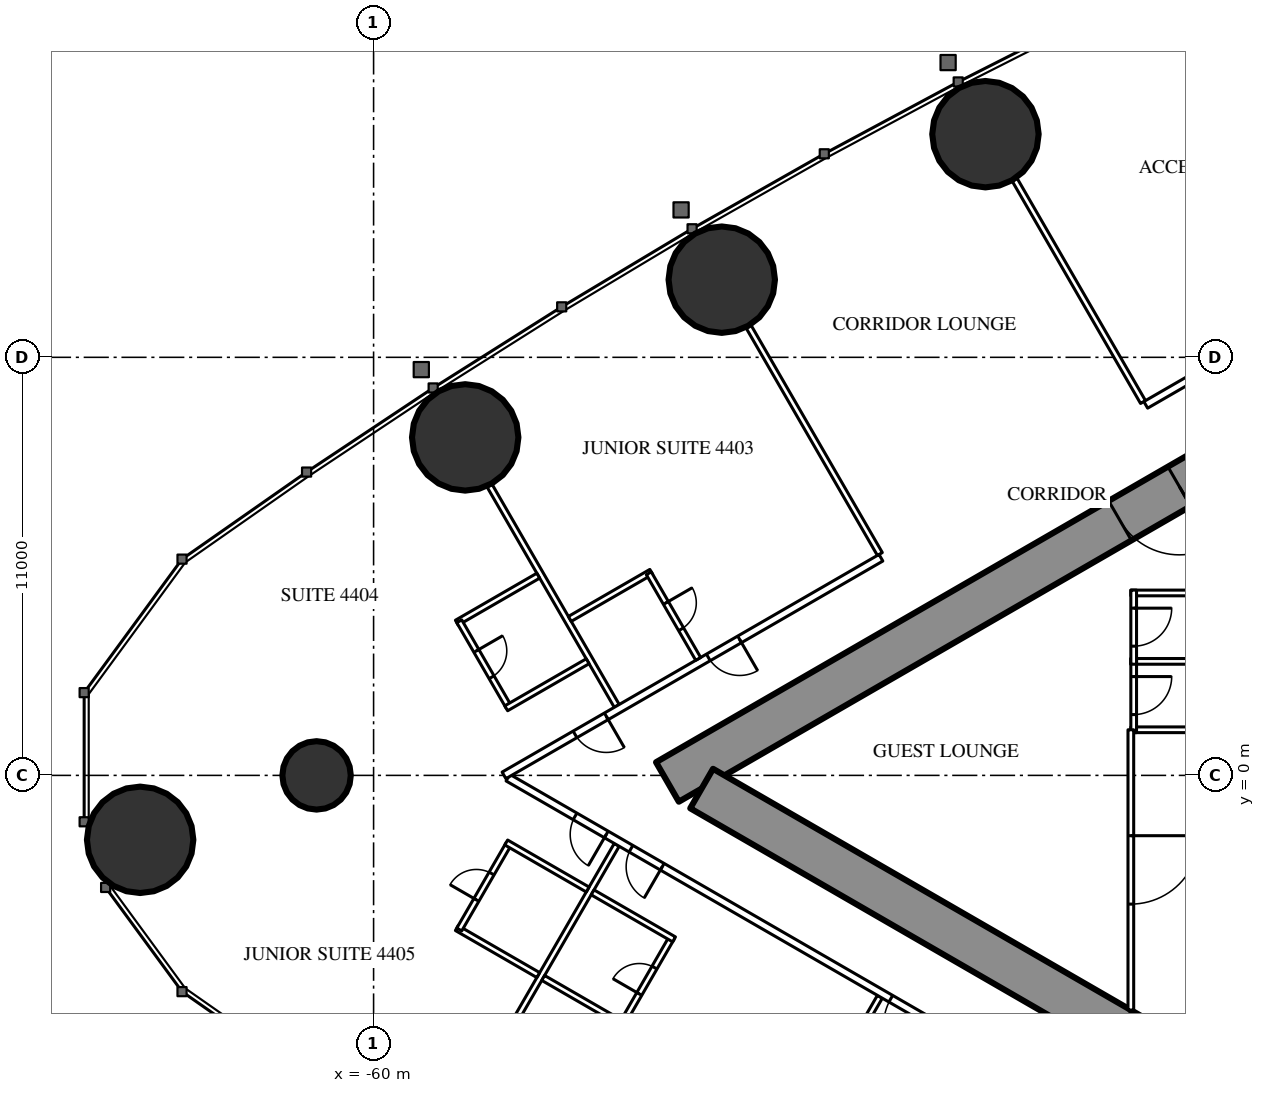
"""IFC4 building model, lengths in metres.
Left out: names, types, materials, properties, quantities, classifications, styles, units other than length and angle.
Written with IfcOpenShell. Run it as: python <this file> out.ifc"""

import sys

from ifc_helpers import new_model, si_unit, direction, frame, frame_2d, origin, origin_2d, place, context, subcontext, project, spatial, rectangle, circle, extrude, element, fill, save


model = new_model("IFC4")
c1 = context("Model", 3, precision=1e-05, world=origin(), true_north=direction((0.0, 1.0)))
c2 = subcontext(c1, "Body", "Model", "MODEL_VIEW")
j1 = project(units=[si_unit("LENGTHUNIT", "METRE"), si_unit("PLANEANGLEUNIT", "RADIAN")], contexts=[c1])
p1 = place(None, origin())
s1 = spatial("IfcSite", under=j1, at=p1, CompositionType="ELEMENT")
p2 = place(p1, origin())
s2 = spatial("IfcBuilding", under=s1, at=p2, CompositionType="ELEMENT")
p3 = place(p2, frame((0.0, 0.0, 166.8)))
s3 = spatial("IfcBuildingStorey", under=s2, at=p3, CompositionType="ELEMENT", Elevation=166.8)
for number, where, z_axis, x_axis in (
    (1, (-66.143, -1.695, 0.0), (0.0, 0.0, 1.0), (1.0, 0.0, 0.0)),
    (2, (-43.9, 16.871, 0.0), (0.0, 0.0, 1.0), (1.0, 0.0, 0.0)),
    (3, (-50.839, 13.043, 0.0), (0.0, 0.0, 1.0), (1.0, 0.0, 0.0)),
    (4, (-57.59, 8.893, 0.0), (0.0, 0.0, 1.0), (1.0, 0.0, 0.0)),
):
    element("IfcColumn", number, at=place(p3, frame(where, z_axis=z_axis, x_axis=x_axis)), inside=s3, PredefinedType="COLUMN", context=c2, shape_type="SweptSolid", body=[
        extrude(circle(Radius=1.4, at=origin_2d()), origin(), (0.0, 0.0, 1.0), 3.5),
    ])
p4 = place(p3, frame((-61.5, 0.0, 0.0), z_axis=(0.0, 0.0, 1.0), x_axis=(1.0, 0.0, 0.0)))
e5 = element("IfcColumn", 5, at=p4, inside=s3, PredefinedType="COLUMN", context=c2, shape_type="SweptSolid", body=[
    extrude(circle(Radius=0.9, at=origin_2d()), origin(), (0.0, 0.0, 1.0), 3.5),
])
p5 = place(p3, frame((-27.2, 14.3, 0.0), z_axis=(0.0, 0.0, 1.0), x_axis=(-0.866026593062, -0.499997940104, 0.0)))
e6 = element("IfcWall", 6, at=p5, inside=s3, PredefinedType="SHEAR", context=c2, shape_type="SweptSolid", body=[
    extrude(rectangle(XDim=28.946, YDim=1.2, at=frame_2d((14.473, 0.0))), origin(), (0.0, 0.0, 1.0), 3.5),
])
p6 = place(p5, frame((4.6, 0.0, 0.0)))
e7 = element("IfcOpeningElement", 7, at=p6, cuts=e6, PredefinedType="OPENING", context=c2, shape_type="SweptSolid", body=[
    extrude(rectangle(XDim=1.0, YDim=2.2, at=frame_2d((0.5, 1.1))), frame((0.0, 0.61, 0.0), z_axis=(0.0, -1.0, 0.0), x_axis=(1.0, 0.0, 0.0)), (0.0, 0.0, 1.0), 1.22),
])
p7 = place(p5, frame((13.395, 0.0, 0.0)))
e8 = element("IfcOpeningElement", 8, at=p7, cuts=e6, PredefinedType="OPENING", context=c2, shape_type="SweptSolid", body=[
    extrude(rectangle(XDim=1.8, YDim=2.2, at=frame_2d((0.9, 1.1))), frame((0.0, 0.61, 0.0), z_axis=(0.0, -1.0, 0.0), x_axis=(1.0, 0.0, 0.0)), (0.0, 0.0, 1.0), 1.22),
])
p8 = place(p3, frame((-27.2, -14.3, 0.0), z_axis=(0.0, 0.0, 1.0), x_axis=(-0.866024021859, 0.500002393557, 0.0)))
e9 = element("IfcWall", 9, at=p8, inside=s3, PredefinedType="SHEAR", context=c2, shape_type="SweptSolid", body=[
    extrude(rectangle(XDim=27.907, YDim=1.2, at=frame_2d((13.954, 0.0))), origin(), (0.0, 0.0, 1.0), 3.5),
])
p9 = place(p8, frame((4.6, 0.0, 0.0)))
e10 = element("IfcOpeningElement", 10, at=p9, cuts=e9, PredefinedType="OPENING", context=c2, shape_type="SweptSolid", body=[
    extrude(rectangle(XDim=1.0, YDim=2.2, at=frame_2d((0.5, 1.1))), frame((0.0, 0.61, 0.0), z_axis=(0.0, -1.0, 0.0), x_axis=(1.0, 0.0, 0.0)), (0.0, 0.0, 1.0), 1.22),
])
p10 = place(p8, frame((13.395, 0.0, 0.0)))
e11 = element("IfcOpeningElement", 11, at=p10, cuts=e9, PredefinedType="OPENING", context=c2, shape_type="SweptSolid", body=[
    extrude(rectangle(XDim=1.8, YDim=2.2, at=frame_2d((0.9, 1.1))), frame((0.0, 0.61, 0.0), z_axis=(0.0, -1.0, 0.0), x_axis=(1.0, 0.0, 0.0)), (0.0, 0.0, 1.0), 1.22),
])
p11 = place(p3, frame((-39.754, 9.823, 0.0), z_axis=(0.0, 0.0, 1.0), x_axis=(-0.499997670926, 0.866026748472, 0.0)))
e12 = element("IfcWall", 12, at=p11, inside=s3, PredefinedType="PARTITIONING", context=c2, shape_type="SweptSolid", body=[
    extrude(rectangle(XDim=6.757, YDim=0.15, at=frame_2d((3.379, 0.0))), origin(), (0.0, 0.0, 1.0), 2.3),
])
p12 = place(p3, frame((-46.679, 5.825, 0.0), z_axis=(0.0, 0.0, 1.0), x_axis=(-0.500006839597, 0.866021454905, 0.0)))
e13 = element("IfcWall", 13, at=p12, inside=s3, PredefinedType="PARTITIONING", context=c2, shape_type="SweptSolid", body=[
    extrude(rectangle(XDim=6.911, YDim=0.15, at=frame_2d((3.456, 0.0))), origin(), (0.0, 0.0, 1.0), 2.3),
])
p13 = place(p3, frame((-53.602, 1.828, 0.0), z_axis=(0.0, 0.0, 1.0), x_axis=(-0.49999191814, 0.866030069798, 0.0)))
e14 = element("IfcWall", 14, at=p13, inside=s3, PredefinedType="PARTITIONING", context=c2, shape_type="SweptSolid", body=[
    extrude(rectangle(XDim=6.692, YDim=0.15, at=frame_2d((3.346, 0.0))), origin(), (0.0, 0.0, 1.0), 2.3),
])
p14 = place(p3, frame((-46.679, -5.825, 0.0), z_axis=(0.0, 0.0, 1.0), x_axis=(-0.500006839597, -0.866021454905, 0.0)))
e15 = element("IfcWall", 15, at=p14, inside=s3, PredefinedType="PARTITIONING", context=c2, shape_type="SweptSolid", body=[
    extrude(rectangle(XDim=6.911, YDim=0.15, at=frame_2d((3.456, 0.0))), origin(), (0.0, 0.0, 1.0), 2.3),
])
p15 = place(p3, frame((-53.602, -1.828, 0.0), z_axis=(0.0, 0.0, 1.0), x_axis=(-0.49999191814, -0.866030069798, 0.0)))
e16 = element("IfcWall", 16, at=p15, inside=s3, PredefinedType="PARTITIONING", context=c2, shape_type="SweptSolid", body=[
    extrude(rectangle(XDim=6.692, YDim=0.15, at=frame_2d((3.346, 0.0))), origin(), (0.0, 0.0, 1.0), 2.3),
])
p16 = place(p3, frame((-44.715, -6.844, 0.0), z_axis=(0.0, 0.0, 1.0), x_axis=(-0.866025261224, 0.500000246922, 0.0)))
e17 = element("IfcWall", 17, at=p16, inside=s3, PredefinedType="PARTITIONING", context=c2, shape_type="SweptSolid", body=[
    extrude(rectangle(XDim=13.567, YDim=0.2, at=frame_2d((6.783, 0.0))), origin(), (0.0, 0.0, 1.0), 3.25),
])
p17 = place(p16, frame((10.579, 0.0, 0.0)))
e18 = element("IfcOpeningElement", 18, at=p17, cuts=e17, PredefinedType="OPENING", context=c2, shape_type="SweptSolid", body=[
    extrude(rectangle(XDim=0.95, YDim=2.2, at=frame_2d((0.475, 1.1))), frame((0.0, 0.11, 0.0), z_axis=(0.0, -1.0, 0.0), x_axis=(1.0, 0.0, 0.0)), (0.0, 0.0, 1.0), 0.22),
])
p18 = place(p16, frame((8.879, 0.0, 0.0)))
e19 = element("IfcOpeningElement", 19, at=p18, cuts=e17, PredefinedType="OPENING", context=c2, shape_type="SweptSolid", body=[
    extrude(rectangle(XDim=0.95, YDim=2.2, at=frame_2d((0.475, 1.1))), frame((0.0, 0.11, 0.0), z_axis=(0.0, -1.0, 0.0), x_axis=(1.0, 0.0, 0.0)), (0.0, 0.0, 1.0), 0.22),
])
p19 = place(p16, frame((0.5, 0.0, 0.0)))
e20 = element("IfcOpeningElement", 20, at=p19, cuts=e17, PredefinedType="OPENING", context=c2, shape_type="SweptSolid", body=[
    extrude(rectangle(XDim=1.435, YDim=2.2, at=frame_2d((0.718, 1.1))), frame((0.0, 0.11, 0.0), z_axis=(0.0, -1.0, 0.0), x_axis=(1.0, 0.0, 0.0)), (0.0, 0.0, 1.0), 0.22),
])
p20 = place(p3, frame((-27.86, 16.575, 0.0), z_axis=(0.0, 0.0, 1.0), x_axis=(-0.866026850238, -0.499997494661, 0.0)))
e21 = element("IfcWall", 21, at=p20, inside=s3, PredefinedType="PARTITIONING", context=c2, shape_type="SweptSolid", body=[
    extrude(rectangle(XDim=13.651, YDim=0.2, at=frame_2d((6.826, 0.0))), origin(), (0.0, 0.0, 1.0), 3.25),
])
p21 = place(p20, frame((3.75, 0.0, 0.0)))
e22 = element("IfcOpeningElement", 22, at=p21, cuts=e21, PredefinedType="OPENING", context=c2, shape_type="SweptSolid", body=[
    extrude(rectangle(XDim=1.0, YDim=2.2, at=frame_2d((0.5, 1.1))), frame((0.0, 0.11, 0.0), z_axis=(0.0, -1.0, 0.0), x_axis=(1.0, 0.0, 0.0)), (0.0, 0.0, 1.0), 0.22),
])
p22 = place(p3, frame((-46.65, 5.726, 0.0), z_axis=(0.0, 0.0, 1.0), x_axis=(-0.866027963864, -0.499995565786, 0.0)))
e23 = element("IfcWall", 23, at=p22, inside=s3, PredefinedType="PARTITIONING", context=c2, shape_type="SweptSolid", body=[
    extrude(rectangle(XDim=11.452, YDim=0.2, at=frame_2d((5.726, 0.0))), origin(), (0.0, 0.0, 1.0), 3.25),
])
p23 = place(p22, frame((4.294, 0.0, 0.0)))
e24 = element("IfcOpeningElement", 24, at=p23, cuts=e23, PredefinedType="OPENING", context=c2, shape_type="SweptSolid", body=[
    extrude(rectangle(XDim=0.95, YDim=2.2, at=frame_2d((0.475, 1.1))), frame((0.0, 0.11, 0.0), z_axis=(0.0, -1.0, 0.0), x_axis=(1.0, 0.0, 0.0)), (0.0, 0.0, 1.0), 0.22),
])
p24 = place(p22, frame((8.344, 0.0, 0.0)))
e25 = element("IfcOpeningElement", 25, at=p24, cuts=e23, PredefinedType="OPENING", context=c2, shape_type="SweptSolid", body=[
    extrude(rectangle(XDim=0.95, YDim=2.2, at=frame_2d((0.475, 1.1))), frame((0.0, 0.11, 0.0), z_axis=(0.0, -1.0, 0.0), x_axis=(1.0, 0.0, 0.0)), (0.0, 0.0, 1.0), 0.22),
])
p25 = place(p3, frame((-52.694, 5.355, 0.0), z_axis=(0.0, 0.0, 1.0), x_axis=(-0.866031185235, -0.4999899861, 0.0)))
e26 = element("IfcWall", 26, at=p25, inside=s3, PredefinedType="PARTITIONING", context=c2, shape_type="SweptSolid", body=[
    extrude(rectangle(XDim=2.475, YDim=0.15, at=frame_2d((1.238, 0.0))), origin(), (0.0, 0.0, 1.0), 3.25),
])
p26 = place(p3, frame((-51.459, 3.065, 0.0), z_axis=(0.0, 0.0, 1.0), x_axis=(-0.499936506574, 0.866062058628, 0.0)))
e27 = element("IfcWall", 27, at=p26, inside=s3, PredefinedType="PARTITIONING", context=c2, shape_type="SweptSolid", body=[
    extrude(rectangle(XDim=2.6, YDim=0.15, at=frame_2d((1.3, 0.0))), origin(), (0.0, 0.0, 1.0), 3.25),
])
p27 = place(p26, frame((0.9, 0.0, 0.0)))
e28 = element("IfcOpeningElement", 28, at=p27, cuts=e27, PredefinedType="OPENING", context=c2, shape_type="SweptSolid", body=[
    extrude(rectangle(XDim=0.8, YDim=2.2, at=frame_2d((0.4, 1.1))), frame((0.0, 0.085, 0.0), z_axis=(0.0, -1.0, 0.0), x_axis=(1.0, 0.0, 0.0)), (0.0, 0.0, 1.0), 0.17),
])
p28 = place(p3, frame((-55.667, 5.255, 0.0), z_axis=(0.0, 0.0, 1.0), x_axis=(-0.866006523861, -0.500032699561, 0.0)))
e29 = element("IfcWall", 29, at=p28, inside=s3, PredefinedType="PARTITIONING", context=c2, shape_type="SweptSolid", body=[
    extrude(rectangle(XDim=2.475, YDim=0.15, at=frame_2d((1.237, 0.0))), origin(), (0.0, 0.0, 1.0), 3.25),
])
p29 = place(p3, frame((-56.446, 1.803, 0.0), z_axis=(0.0, 0.0, 1.0), x_axis=(-0.499936506574, 0.866062058628, 0.0)))
e30 = element("IfcWall", 30, at=p29, inside=s3, PredefinedType="PARTITIONING", context=c2, shape_type="SweptSolid", body=[
    extrude(rectangle(XDim=2.6, YDim=0.15, at=frame_2d((1.3, 0.0))), origin(), (0.0, 0.0, 1.0), 3.25),
])
p30 = place(p29, frame((0.9, 0.0, 0.0)))
e31 = element("IfcOpeningElement", 31, at=p30, cuts=e30, PredefinedType="OPENING", context=c2, shape_type="SweptSolid", body=[
    extrude(rectangle(XDim=0.8, YDim=2.2, at=frame_2d((0.4, 1.1))), frame((0.0, 0.085, 0.0), z_axis=(0.0, -1.0, 0.0), x_axis=(1.0, 0.0, 0.0)), (0.0, 0.0, 1.0), 0.17),
])
p31 = place(p3, frame((-54.367, 3.003, 0.0), z_axis=(0.0, 0.0, 1.0), x_axis=(-0.866031185235, -0.4999899861, 0.0)))
e32 = element("IfcWall", 32, at=p31, inside=s3, PredefinedType="PARTITIONING", context=c2, shape_type="SweptSolid", body=[
    extrude(rectangle(XDim=2.475, YDim=0.15, at=frame_2d((1.238, 0.0))), origin(), (0.0, 0.0, 1.0), 3.25),
])
p32 = place(p3, frame((-55.667, -5.255, 0.0), z_axis=(0.0, 0.0, 1.0), x_axis=(-0.866006523861, 0.500032699561, 0.0)))
e33 = element("IfcWall", 33, at=p32, inside=s3, PredefinedType="PARTITIONING", context=c2, shape_type="SweptSolid", body=[
    extrude(rectangle(XDim=2.475, YDim=0.15, at=frame_2d((1.237, 0.0))), origin(), (0.0, 0.0, 1.0), 3.25),
])
p33 = place(p3, frame((-56.446, -1.803, 0.0), z_axis=(0.0, 0.0, 1.0), x_axis=(-0.499936506574, -0.866062058628, 0.0)))
e34 = element("IfcWall", 34, at=p33, inside=s3, PredefinedType="PARTITIONING", context=c2, shape_type="SweptSolid", body=[
    extrude(rectangle(XDim=2.6, YDim=0.15, at=frame_2d((1.3, 0.0))), origin(), (0.0, 0.0, 1.0), 3.25),
])
p34 = place(p33, frame((0.9, 0.0, 0.0)))
e35 = element("IfcOpeningElement", 35, at=p34, cuts=e34, PredefinedType="OPENING", context=c2, shape_type="SweptSolid", body=[
    extrude(rectangle(XDim=0.8, YDim=2.2, at=frame_2d((0.4, 1.1))), frame((0.0, 0.085, 0.0), z_axis=(0.0, -1.0, 0.0), x_axis=(1.0, 0.0, 0.0)), (0.0, 0.0, 1.0), 0.17),
])
for number, where, z_axis, x_axis in (
    (36, (-54.367, -3.003, 0.0), (0.0, 0.0, 1.0), (-0.866, 0.5, 0.0)),
    (37, (-53.394, -6.567, 0.0), (0.0, 0.0, 1.0), (-0.866, 0.5, 0.0)),
):
    element("IfcWall", number, at=place(p3, frame(where, z_axis=z_axis, x_axis=x_axis)), inside=s3, PredefinedType="PARTITIONING", context=c2, shape_type="SweptSolid", body=[
        extrude(rectangle(XDim=2.475, YDim=0.15, at=frame_2d((1.238, 0.0))), origin(), (0.0, 0.0, 1.0), 3.25),
    ])
p35 = place(p3, frame((-52.159, -4.278, 0.0), z_axis=(0.0, 0.0, 1.0), x_axis=(-0.500047596559, -0.865997922154, 0.0)))
e38 = element("IfcWall", 38, at=p35, inside=s3, PredefinedType="PARTITIONING", context=c2, shape_type="SweptSolid", body=[
    extrude(rectangle(XDim=2.6, YDim=0.15, at=frame_2d((1.3, 0.0))), origin(), (0.0, 0.0, 1.0), 3.25),
])
p36 = place(p35, frame((0.9, 0.0, 0.0)))
e39 = element("IfcOpeningElement", 39, at=p36, cuts=e38, PredefinedType="OPENING", context=c2, shape_type="SweptSolid", body=[
    extrude(rectangle(XDim=0.8, YDim=2.2, at=frame_2d((0.4, 1.1))), frame((0.0, 0.085, 0.0), z_axis=(0.0, -1.0, 0.0), x_axis=(1.0, 0.0, 0.0)), (0.0, 0.0, 1.0), 0.17),
])
p37 = place(p3, frame((-52.094, -4.315, 0.0), z_axis=(0.0, 0.0, 1.0), x_axis=(-0.866006523861, 0.500032699561, 0.0)))
e40 = element("IfcWall", 40, at=p37, inside=s3, PredefinedType="PARTITIONING", context=c2, shape_type="SweptSolid", body=[
    extrude(rectangle(XDim=2.475, YDim=0.15, at=frame_2d((1.237, 0.0))), origin(), (0.0, 0.0, 1.0), 2.45),
])
for number, where, z_axis, x_axis in (
    (41, (-37.9, 1.2, 0.0), (0.0, 0.0, 1.0), (-1.0, 0.0, 0.0)),
    (42, (-37.9, 3.0, 0.0), (0.0, 0.0, 1.0), (-1.0, 0.0, 0.0)),
    (43, (-37.9, 4.8, 0.0), (0.0, 0.0, 1.0), (-1.0, 0.0, 0.0)),
):
    element("IfcWall", number, at=place(p3, frame(where, z_axis=z_axis, x_axis=x_axis)), inside=s3, PredefinedType="PARTITIONING", context=c2, shape_type="SweptSolid", body=[
        extrude(rectangle(XDim=2.175, YDim=0.15, at=frame_2d((1.087, 0.0))), origin(), (0.0, 0.0, 1.0), 3.25),
    ])
p38 = place(p3, frame((-40.0, 3.075, 0.0), z_axis=(0.0, 0.0, 1.0), x_axis=(0.0, -1.0, 0.0)))
e44 = element("IfcWall", 44, at=p38, inside=s3, PredefinedType="PARTITIONING", context=c2, shape_type="SweptSolid", body=[
    extrude(rectangle(XDim=1.95, YDim=0.15, at=frame_2d((0.975, 0.0))), origin(), (0.0, 0.0, 1.0), 3.25),
])
p39 = place(p38, frame((0.475, 0.0, 0.0)))
e45 = element("IfcOpeningElement", 45, at=p39, cuts=e44, PredefinedType="OPENING", context=c2, shape_type="SweptSolid", body=[
    extrude(rectangle(XDim=1.0, YDim=2.2, at=frame_2d((0.5, 1.1))), frame((0.0, 0.085, 0.0), z_axis=(0.0, -1.0, 0.0), x_axis=(1.0, 0.0, 0.0)), (0.0, 0.0, 1.0), 0.17),
])
p40 = place(p3, frame((-40.0, 4.875, 0.0), z_axis=(0.0, 0.0, 1.0), x_axis=(0.0, -1.0, 0.0)))
e46 = element("IfcWall", 46, at=p40, inside=s3, PredefinedType="PARTITIONING", context=c2, shape_type="SweptSolid", body=[
    extrude(rectangle(XDim=1.95, YDim=0.15, at=frame_2d((0.975, 0.0))), origin(), (0.0, 0.0, 1.0), 3.25),
])
p41 = place(p40, frame((0.475, 0.0, 0.0)))
e47 = element("IfcOpeningElement", 47, at=p41, cuts=e46, PredefinedType="OPENING", context=c2, shape_type="SweptSolid", body=[
    extrude(rectangle(XDim=1.0, YDim=2.2, at=frame_2d((0.5, 1.1))), frame((0.0, 0.085, 0.0), z_axis=(0.0, -1.0, 0.0), x_axis=(1.0, 0.0, 0.0)), (0.0, 0.0, 1.0), 0.17),
])
p42 = place(p3, frame((-40.075, 1.2, 0.0), z_axis=(0.0, 0.0, 1.0), x_axis=(0.0, -1.0, 0.0)))
e48 = element("IfcWall", 48, at=p42, inside=s3, PredefinedType="PARTITIONING", context=c2, shape_type="SweptSolid", body=[
    extrude(rectangle(XDim=7.374, YDim=0.15, at=frame_2d((3.687, 0.0))), origin(), (0.0, 0.0, 1.0), 3.25),
])
p43 = place(p42, frame((2.787, 0.0, 0.0)))
e49 = element("IfcOpeningElement", 49, at=p43, cuts=e48, PredefinedType="OPENING", context=c2, shape_type="SweptSolid", body=[
    extrude(rectangle(XDim=1.8, YDim=2.2, at=frame_2d((0.9, 1.1))), frame((0.0, 0.085, 0.0), z_axis=(0.0, -1.0, 0.0), x_axis=(1.0, 0.0, 0.0)), (0.0, 0.0, 1.0), 0.17),
])
p44 = place(p27, origin())
e50 = element("IfcDoor", 50, at=p44, inside=s3, OperationType="SINGLE_SWING_RIGHT", PredefinedType="DOOR", context=c2, shape_type="SweptSolid", body=[
    extrude(rectangle(XDim=0.8, YDim=2.2, at=frame_2d((0.4, 1.1))), frame((0.0, 0.025, 0.0), z_axis=(0.0, -1.0, 0.0), x_axis=(1.0, 0.0, 0.0)), (0.0, 0.0, 1.0), 0.05),
])
fill(e28, e50)
p45 = place(p23, origin())
e51 = element("IfcDoor", 51, at=p45, inside=s3, OperationType="SINGLE_SWING_LEFT", PredefinedType="DOOR", context=c2, shape_type="SweptSolid", body=[
    extrude(rectangle(XDim=0.95, YDim=2.2, at=frame_2d((0.475, 1.1))), frame((0.0, 0.025, 0.0), z_axis=(0.0, -1.0, 0.0), x_axis=(1.0, 0.0, 0.0)), (0.0, 0.0, 1.0), 0.05),
])
fill(e24, e51)
p46 = place(p30, origin())
e52 = element("IfcDoor", 52, at=p46, inside=s3, OperationType="SINGLE_SWING_RIGHT", PredefinedType="DOOR", context=c2, shape_type="SweptSolid", body=[
    extrude(rectangle(XDim=0.8, YDim=2.2, at=frame_2d((0.4, 1.1))), frame((0.0, 0.025, 0.0), z_axis=(0.0, -1.0, 0.0), x_axis=(1.0, 0.0, 0.0)), (0.0, 0.0, 1.0), 0.05),
])
fill(e31, e52)
p47 = place(p24, origin())
e53 = element("IfcDoor", 53, at=p47, inside=s3, OperationType="SINGLE_SWING_LEFT", PredefinedType="DOOR", context=c2, shape_type="SweptSolid", body=[
    extrude(rectangle(XDim=0.95, YDim=2.2, at=frame_2d((0.475, 1.1))), frame((0.0, 0.025, 0.0), z_axis=(0.0, -1.0, 0.0), x_axis=(1.0, 0.0, 0.0)), (0.0, 0.0, 1.0), 0.05),
])
fill(e25, e53)
p48 = place(p34, origin())
e54 = element("IfcDoor", 54, at=p48, inside=s3, OperationType="SINGLE_SWING_RIGHT", PredefinedType="DOOR", context=c2, shape_type="SweptSolid", body=[
    extrude(rectangle(XDim=0.8, YDim=2.2, at=frame_2d((0.4, 1.1))), frame((0.0, 0.025, 0.0), z_axis=(0.0, -1.0, 0.0), x_axis=(1.0, 0.0, 0.0)), (0.0, 0.0, 1.0), 0.05),
])
fill(e35, e54)
p49 = place(p17, origin())
e55 = element("IfcDoor", 55, at=p49, inside=s3, OperationType="SINGLE_SWING_LEFT", PredefinedType="DOOR", context=c2, shape_type="SweptSolid", body=[
    extrude(rectangle(XDim=0.95, YDim=2.2, at=frame_2d((0.475, 1.1))), frame((0.0, 0.025, 0.0), z_axis=(0.0, -1.0, 0.0), x_axis=(1.0, 0.0, 0.0)), (0.0, 0.0, 1.0), 0.05),
])
fill(e18, e55)
p50 = place(p36, origin())
e56 = element("IfcDoor", 56, at=p50, inside=s3, OperationType="SINGLE_SWING_RIGHT", PredefinedType="DOOR", context=c2, shape_type="SweptSolid", body=[
    extrude(rectangle(XDim=0.8, YDim=2.2, at=frame_2d((0.4, 1.1))), frame((0.0, 0.025, 0.0), z_axis=(0.0, -1.0, 0.0), x_axis=(1.0, 0.0, 0.0)), (0.0, 0.0, 1.0), 0.05),
])
fill(e39, e56)
p51 = place(p18, origin())
e57 = element("IfcDoor", 57, at=p51, inside=s3, OperationType="SINGLE_SWING_LEFT", PredefinedType="DOOR", context=c2, shape_type="SweptSolid", body=[
    extrude(rectangle(XDim=0.95, YDim=2.2, at=frame_2d((0.475, 1.1))), frame((0.0, 0.025, 0.0), z_axis=(0.0, -1.0, 0.0), x_axis=(1.0, 0.0, 0.0)), (0.0, 0.0, 1.0), 0.05),
])
fill(e19, e57)
p52 = place(p19, origin())
e58 = element("IfcDoor", 58, at=p52, inside=s3, OperationType="SINGLE_SWING_LEFT", PredefinedType="DOOR", context=c2, shape_type="SweptSolid", body=[
    extrude(rectangle(XDim=1.435, YDim=2.2, at=frame_2d((0.718, 1.1))), frame((0.0, 0.025, 0.0), z_axis=(0.0, -1.0, 0.0), x_axis=(1.0, 0.0, 0.0)), (0.0, 0.0, 1.0), 0.05),
])
fill(e20, e58)
p53 = place(p39, origin())
e59 = element("IfcDoor", 59, at=p53, inside=s3, OperationType="SINGLE_SWING_LEFT", PredefinedType="DOOR", context=c2, shape_type="SweptSolid", body=[
    extrude(rectangle(XDim=1.0, YDim=2.2, at=frame_2d((0.5, 1.1))), frame((0.0, 0.025, 0.0), z_axis=(0.0, -1.0, 0.0), x_axis=(1.0, 0.0, 0.0)), (0.0, 0.0, 1.0), 0.05),
])
fill(e45, e59)
p54 = place(p41, origin())
e60 = element("IfcDoor", 60, at=p54, inside=s3, OperationType="SINGLE_SWING_LEFT", PredefinedType="DOOR", context=c2, shape_type="SweptSolid", body=[
    extrude(rectangle(XDim=1.0, YDim=2.2, at=frame_2d((0.5, 1.1))), frame((0.0, 0.025, 0.0), z_axis=(0.0, -1.0, 0.0), x_axis=(1.0, 0.0, 0.0)), (0.0, 0.0, 1.0), 0.05),
])
fill(e47, e60)
p55 = place(p43, origin())
e61 = element("IfcDoor", 61, at=p55, inside=s3, OperationType="DOUBLE_DOOR_SINGLE_SWING", PredefinedType="DOOR", context=c2, shape_type="SweptSolid", body=[
    extrude(rectangle(XDim=1.8, YDim=2.2, at=frame_2d((0.9, 1.1))), frame((0.0, 0.025, 0.0), z_axis=(0.0, -1.0, 0.0), x_axis=(1.0, 0.0, 0.0)), (0.0, 0.0, 1.0), 0.05),
])
fill(e49, e61)
p56 = place(p7, origin())
e62 = element("IfcDoor", 62, at=p56, inside=s3, OperationType="DOUBLE_DOOR_SINGLE_SWING", PredefinedType="DOOR", context=c2, shape_type="SweptSolid", body=[
    extrude(rectangle(XDim=1.8, YDim=2.2, at=frame_2d((0.9, 1.1))), frame((0.0, 0.025, 0.0), z_axis=(0.0, -1.0, 0.0), x_axis=(1.0, 0.0, 0.0)), (0.0, 0.0, 1.0), 0.05),
])
fill(e8, e62)
save(model, sys.argv[1])
